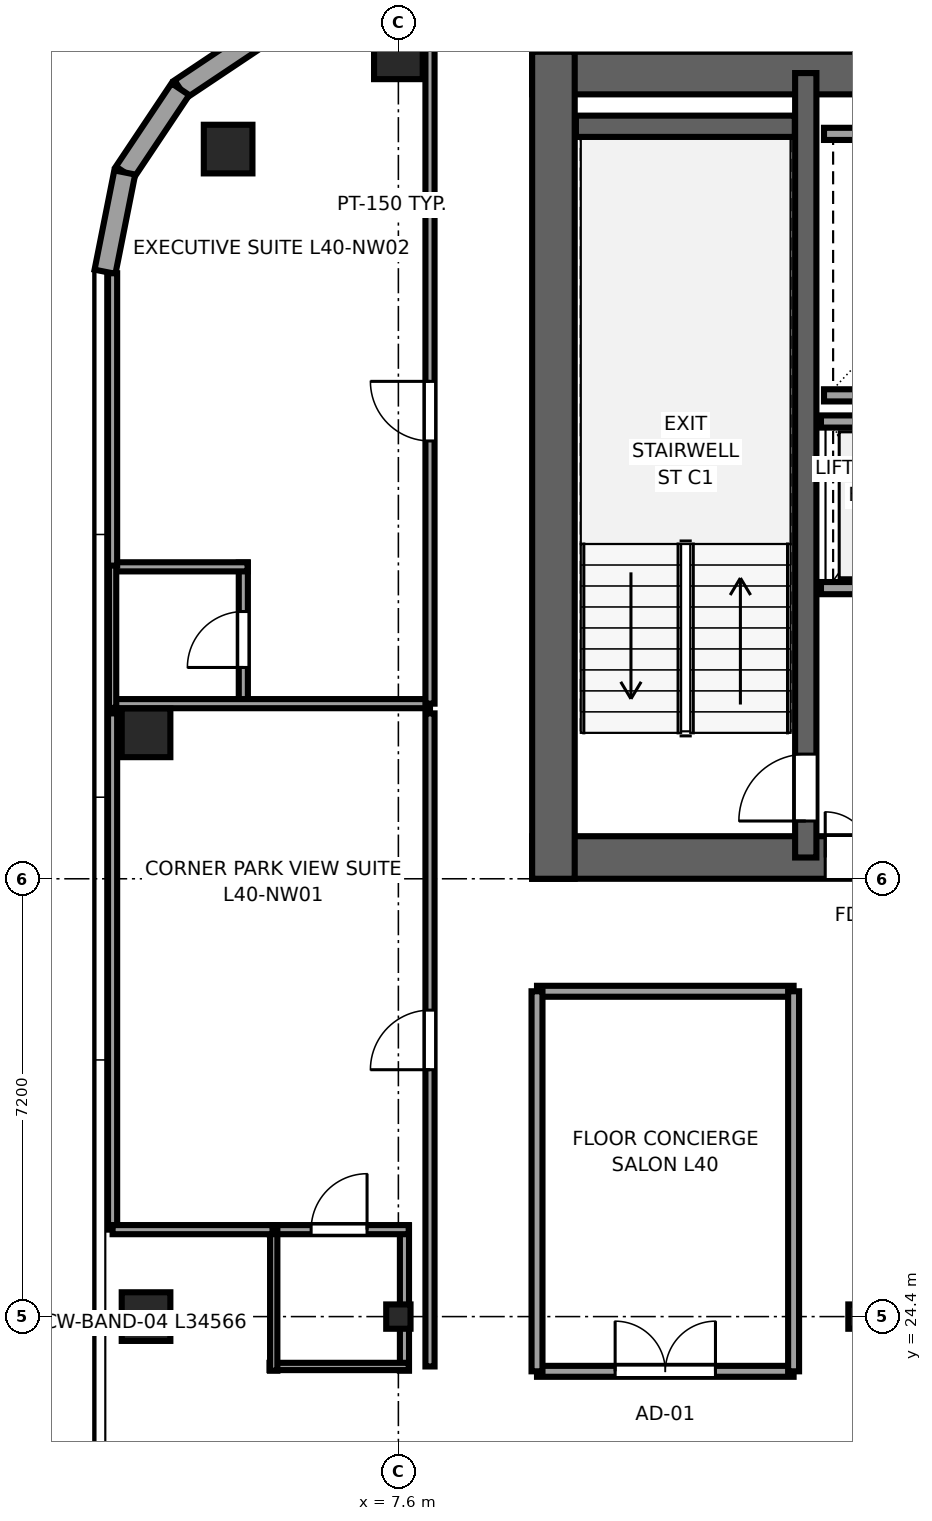
"""IFC4 building model, lengths in metres.
Left out: names, types, materials, properties, quantities, classifications, styles, units other than length and angle.
Written with IfcOpenShell. Run it as: python <this file> out.ifc"""

import sys

from ifc_helpers import new_model, si_unit, direction, frame, frame_2d, origin, origin_2d, place, context, subcontext, project, spatial, rectangle, i_section, extrude, source, transform, mapped, element, fill, save


model = new_model("IFC4")
c1 = context("Model", 3, precision=1e-05, world=origin(), true_north=direction((0.0, 1.0)))
c2 = subcontext(c1, "Body", "Model", "MODEL_VIEW")
j1 = project(units=[si_unit("LENGTHUNIT", "METRE"), si_unit("PLANEANGLEUNIT", "RADIAN")], contexts=[c1])
p1 = place(None, origin())
s1 = spatial("IfcSite", under=j1, at=p1, CompositionType="ELEMENT")
p2 = place(p1, origin())
s2 = spatial("IfcBuilding", under=s1, at=p2, CompositionType="ELEMENT")
p3 = place(p2, frame((0.0, 0.0, 154.15)))
s3 = spatial("IfcBuildingStorey", under=s2, at=p3, CompositionType="ELEMENT", Elevation=154.15)
p4 = place(p3, frame((9.8, 31.95, 0.0), z_axis=(0.0, 0.0, 1.0), x_axis=(1.0, 0.0, 0.0)))
e1 = element("IfcWall", 1, at=p4, inside=s3, PredefinedType="SHEAR", context=c2, shape_type="SweptSolid", body=[
    extrude(rectangle(XDim=26.4, YDim=0.7, at=frame_2d((13.2, 0.0))), origin(), (0.0, 0.0, 1.0), 3.55),
])
p5 = place(p4, frame((6.32, 0.0, 0.0), z_axis=(0.0, 0.0, 1.0), x_axis=(-1.0, 0.0, 0.0)))
e2 = element("IfcOpeningElement", 2, at=p5, cuts=e1, PredefinedType="OPENING", context=c2, shape_type="SweptSolid", body=[
    extrude(rectangle(XDim=1.5, YDim=2.04, at=frame_2d((0.75, 1.02))), frame((0.0, 0.36, 0.0), z_axis=(0.0, -1.0, 0.0), x_axis=(1.0, 0.0, 0.0)), (0.0, 0.0, 1.0), 0.72),
])
p6 = place(p4, frame((13.95, 0.0, 0.0), z_axis=(0.0, 0.0, 1.0), x_axis=(-1.0, 0.0, 0.0)))
e3 = element("IfcOpeningElement", 3, at=p6, cuts=e1, PredefinedType="OPENING", context=c2, shape_type="SweptSolid", body=[
    extrude(rectangle(XDim=1.5, YDim=2.04, at=frame_2d((0.75, 1.02))), frame((0.0, 0.36, 0.0), z_axis=(0.0, -1.0, 0.0), x_axis=(1.0, 0.0, 0.0)), (0.0, 0.0, 1.0), 0.72),
])
p7 = place(p4, frame((20.25, 0.0, 0.0), z_axis=(0.0, 0.0, 1.0), x_axis=(-1.0, 0.0, 0.0)))
e4 = element("IfcOpeningElement", 4, at=p7, cuts=e1, PredefinedType="OPENING", context=c2, shape_type="SweptSolid", body=[
    extrude(rectangle(XDim=1.5, YDim=2.04, at=frame_2d((0.75, 1.02))), frame((0.0, 0.36, 0.0), z_axis=(0.0, -1.0, 0.0), x_axis=(1.0, 0.0, 0.0)), (0.0, 0.0, 1.0), 0.72),
])
p8 = place(p4, frame((8.37, 0.0, 0.0), z_axis=(0.0, 0.0, 1.0), x_axis=(-1.0, 0.0, 0.0)))
e5 = element("IfcOpeningElement", 5, at=p8, cuts=e1, PredefinedType="OPENING", context=c2, shape_type="SweptSolid", body=[
    extrude(rectangle(XDim=0.82, YDim=2.01, at=frame_2d((0.41, 1.005))), frame((0.0, 0.36, 0.0), z_axis=(0.0, -1.0, 0.0), x_axis=(1.0, 0.0, 0.0)), (0.0, 0.0, 1.0), 0.72),
])
p9 = place(p3, frame((9.8, 44.85, 0.0), z_axis=(0.0, 0.0, 1.0), x_axis=(1.0, 0.0, 0.0)))
e6 = element("IfcWall", 6, at=p9, inside=s3, PredefinedType="SHEAR", context=c2, shape_type="SweptSolid", body=[
    extrude(rectangle(XDim=26.4, YDim=0.7, at=frame_2d((13.2, 0.0))), origin(), (0.0, 0.0, 1.0), 3.55),
])
p10 = place(p3, frame((10.15, 31.6, 0.0), z_axis=(0.0, 0.0, 1.0), x_axis=(0.0, 1.0, 0.0)))
e7 = element("IfcWall", 7, at=p10, inside=s3, PredefinedType="SHEAR", context=c2, shape_type="SweptSolid", body=[
    extrude(rectangle(XDim=13.6, YDim=0.7, at=frame_2d((6.8, 0.0))), origin(), (0.0, 0.0, 1.0), 3.55),
])
p11 = place(p3, frame((14.3, 31.95, 0.0), z_axis=(0.0, 0.0, 1.0), x_axis=(0.0, 1.0, 0.0)))
e8 = element("IfcWall", 8, at=p11, inside=s3, PredefinedType="SHEAR", context=c2, shape_type="SweptSolid", body=[
    extrude(rectangle(XDim=12.9, YDim=0.35, at=frame_2d((6.45, 0.0))), origin(), (0.0, 0.0, 1.0), 3.55),
])
p12 = place(p11, frame((0.6, 0.0, 0.0)))
e9 = element("IfcOpeningElement", 9, at=p12, cuts=e8, PredefinedType="OPENING", context=c2, shape_type="SweptSolid", body=[
    extrude(rectangle(XDim=1.1, YDim=2.12, at=frame_2d((0.55, 1.06))), frame((0.0, 0.185, 0.0), z_axis=(0.0, -1.0, 0.0), x_axis=(1.0, 0.0, 0.0)), (0.0, 0.0, 1.0), 0.37),
])
p13 = place(p3, frame((10.52, 43.975, 0.0), z_axis=(0.0, 0.0, 1.0), x_axis=(1.0, 0.0, 0.0)))
e10 = element("IfcWall", 10, at=p13, inside=s3, PredefinedType="SHEAR", context=c2, shape_type="SweptSolid", body=[
    extrude(rectangle(XDim=3.6, YDim=0.35, at=frame_2d((1.8, 0.0))), origin(), (0.0, 0.0, 1.0), 3.55),
])
m1 = source(origin(), c2, "Body", "SweptSolid", [
    extrude(rectangle(XDim=0.8, YDim=0.8, at=origin_2d()), origin(), (0.0, 0.0, 1.0), 3.55),
])
p14 = place(p3, frame((3.45, 24.4, 0.0), z_axis=(0.0, 0.0, 1.0), x_axis=(1.0, 0.0, 0.0)))
e11 = element("IfcColumn", 11, at=p14, inside=s3, PredefinedType="COLUMN", context=c2, shape_type="MappedRepresentation", body=[
    mapped(m1, transform((0.0, 0.0, 0.0), x_axis=(1.0, 0.0, 0.0), y_axis=(0.0, 1.0, 0.0), z_axis=(0.0, 0.0, 1.0), scale=1.0)),
])
m2 = source(origin(), c2, "Body", "SweptSolid", [
    extrude(i_section(OverallWidth=0.4, OverallDepth=0.4, WebThickness=0.02, FlangeThickness=0.035, at=origin_2d()), origin(), (0.0, 0.0, 1.0), 3.55),
])
for number, where, z_axis, x_axis in (
    (12, (7.6, 24.4, 0.0), (0.0, 0.0, 1.0), (1.0, 0.0, 0.0)),
    (13, (15.2, 24.4, 0.0), (0.0, 0.0, 1.0), (1.0, 0.0, 0.0)),
):
    element("IfcColumn", number, at=place(p3, frame(where, z_axis=z_axis, x_axis=x_axis)), inside=s3, PredefinedType="COLUMN", context=c2, shape_type="MappedRepresentation", body=[
        mapped(m2, transform((0.0, 0.0, 0.0), x_axis=(1.0, 0.0, 0.0), y_axis=(0.0, 1.0, 0.0), z_axis=(0.0, 0.0, 1.0), scale=1.0)),
    ])
for number, where, z_axis, x_axis in (
    (14, (4.8, 43.6, 0.0), (0.0, 0.0, 1.0), (1.0, 0.0, 0.0)),
    (15, (7.6, 45.15, 0.0), (0.0, 0.0, 1.0), (1.0, 0.0, 0.0)),
    (16, (3.45, 34.0, 0.0), (0.0, 0.0, 1.0), (1.0, 0.0, 0.0)),
):
    element("IfcColumn", number, at=place(p3, frame(where, z_axis=z_axis, x_axis=x_axis)), inside=s3, PredefinedType="COLUMN", context=c2, shape_type="MappedRepresentation", body=[
        mapped(m1, transform((0.0, 0.0, 0.0), x_axis=(1.0, 0.0, 0.0), y_axis=(0.0, 1.0, 0.0), z_axis=(0.0, 0.0, 1.0), scale=1.0)),
    ])
for number, where, z_axis, x_axis in (
    (17, (5.385, 45.5, 0.0), (0.0, 0.0, 1.0), (-0.832, -0.556, 0.0)),
    (18, (4.015, 44.585, 0.0), (0.0, 0.0, 1.0), (-0.556, -0.831, 0.0)),
):
    element("IfcWall", number, at=place(p3, frame(where, z_axis=z_axis, x_axis=x_axis)), inside=s3, PredefinedType="SOLIDWALL", context=c2, shape_type="SweptSolid", body=[
        extrude(rectangle(XDim=1.647, YDim=0.35, at=frame_2d((0.824, 0.0))), origin(), (0.0, 0.0, 1.0), 2.832),
    ])
p15 = place(p3, frame((3.1, 43.216, 0.0), z_axis=(0.0, 0.0, 1.0), x_axis=(-0.195044345786, -0.980794424524, 0.0)))
e19 = element("IfcWall", 19, at=p15, inside=s3, PredefinedType="SOLIDWALL", context=c2, shape_type="SweptSolid", body=[
    extrude(rectangle(XDim=1.665, YDim=0.35, at=frame_2d((0.833, 0.0))), origin(), (0.0, 0.0, 1.0), 3.37),
])
for number, where, z_axis, x_axis in (
    (20, (14.6, 39.55, 0.0), (0.0, 0.0, 1.0), (1.0, 0.0, 0.0)),
    (21, (14.6, 43.85, 0.0), (0.0, 0.0, 1.0), (1.0, 0.0, 0.0)),
):
    element("IfcWall", number, at=place(p3, frame(where, z_axis=z_axis, x_axis=x_axis)), inside=s3, PredefinedType="SOLIDWALL", context=c2, shape_type="SweptSolid", body=[
        extrude(rectangle(XDim=4.1, YDim=0.2, at=frame_2d((2.05, 0.0))), origin(), (0.0, 0.0, 1.0), 3.37),
    ])
p16 = place(p3, frame((14.55, 36.38, 0.0), z_axis=(0.0, 0.0, 1.0), x_axis=(1.0, 0.0, 0.0)))
e22 = element("IfcWall", 22, at=p16, inside=s3, PredefinedType="SOLIDWALL", context=c2, shape_type="SweptSolid", body=[
    extrude(rectangle(XDim=4.075, YDim=0.2, at=frame_2d((2.038, 0.0))), origin(), (0.0, 0.0, 1.0), 3.37),
])
p17 = place(p16, frame((0.55, 0.0, 0.0)))
e23 = element("IfcOpeningElement", 23, at=p17, cuts=e22, PredefinedType="OPENING", context=c2, shape_type="SweptSolid", body=[
    extrude(rectangle(XDim=1.1, YDim=2.12, at=frame_2d((0.55, 1.06))), frame((0.0, 0.11, 0.0), z_axis=(0.0, -1.0, 0.0), x_axis=(1.0, 0.0, 0.0)), (0.0, 0.0, 1.0), 0.22),
])
p18 = place(p16, frame((2.45, 0.0, 0.0)))
e24 = element("IfcOpeningElement", 24, at=p18, cuts=e22, PredefinedType="OPENING", context=c2, shape_type="SweptSolid", body=[
    extrude(rectangle(XDim=1.1, YDim=2.12, at=frame_2d((0.55, 1.06))), frame((0.0, 0.11, 0.0), z_axis=(0.0, -1.0, 0.0), x_axis=(1.0, 0.0, 0.0)), (0.0, 0.0, 1.0), 0.22),
])
p19 = place(p3, frame((14.55, 39.12, 0.0), z_axis=(0.0, 0.0, 1.0), x_axis=(1.0, 0.0, 0.0)))
e25 = element("IfcWall", 25, at=p19, inside=s3, PredefinedType="SOLIDWALL", context=c2, shape_type="SweptSolid", body=[
    extrude(rectangle(XDim=4.075, YDim=0.2, at=frame_2d((2.038, 0.0))), origin(), (0.0, 0.0, 1.0), 3.37),
])
p20 = place(p3, frame((7.7, 23.51, 0.0), z_axis=(0.0, 0.0, 1.0), x_axis=(0.0, 1.0, 0.0)))
e26 = element("IfcWall", 26, at=p20, inside=s3, PredefinedType="PARTITIONING", context=c2, shape_type="SweptSolid", body=[
    extrude(rectangle(XDim=2.39, YDim=0.15, at=frame_2d((1.195, 0.0))), origin(), (0.0, 0.0, 1.0), 2.16),
])
p21 = place(p3, frame((5.48, 23.58, 0.0), z_axis=(0.0, 0.0, 1.0), x_axis=(1.0, 0.0, 0.0)))
e27 = element("IfcWall", 27, at=p21, inside=s3, PredefinedType="PLUMBINGWALL", context=c2, shape_type="SweptSolid", body=[
    extrude(rectangle(XDim=2.29, YDim=0.12, at=frame_2d((1.145, 0.0))), origin(), (0.0, 0.0, 1.0), 3.37),
])
p22 = place(p3, frame((5.48, 25.83, 0.0), z_axis=(0.0, 0.0, 1.0), x_axis=(1.0, 0.0, 0.0)))
e28 = element("IfcWall", 28, at=p22, inside=s3, PredefinedType="PARTITIONING", context=c2, shape_type="SweptSolid", body=[
    extrude(rectangle(XDim=2.29, YDim=0.15, at=frame_2d((1.145, 0.0))), origin(), (0.0, 0.0, 1.0), 3.37),
])
p23 = place(p22, frame((0.685, 0.0, 0.0)))
e29 = element("IfcOpeningElement", 29, at=p23, cuts=e28, PredefinedType="OPENING", context=c2, shape_type="SweptSolid", body=[
    extrude(rectangle(XDim=0.92, YDim=2.01, at=frame_2d((0.46, 1.005))), frame((0.0, 0.085, 0.0), z_axis=(0.0, -1.0, 0.0), x_axis=(1.0, 0.0, 0.0)), (0.0, 0.0, 1.0), 0.17),
])
p24 = place(p3, frame((5.55, 23.51, 0.0), z_axis=(0.0, 0.0, 1.0), x_axis=(0.0, 1.0, 0.0)))
e30 = element("IfcWall", 30, at=p24, inside=s3, PredefinedType="PLUMBINGWALL", context=c2, shape_type="SweptSolid", body=[
    extrude(rectangle(XDim=2.39, YDim=0.12, at=frame_2d((1.195, 0.0))), origin(), (0.0, 0.0, 1.0), 3.37),
])
p25 = place(p3, frame((5.05, 34.41, 0.0), z_axis=(0.0, 0.0, 1.0), x_axis=(0.0, 1.0, 0.0)))
e31 = element("IfcWall", 31, at=p25, inside=s3, PredefinedType="PARTITIONING", context=c2, shape_type="SweptSolid", body=[
    extrude(rectangle(XDim=2.39, YDim=0.15, at=frame_2d((1.195, 0.0))), origin(), (0.0, 0.0, 1.0), 3.37),
])
p26 = place(p25, frame((0.665, 0.0, 0.0)))
e32 = element("IfcOpeningElement", 32, at=p26, cuts=e31, PredefinedType="OPENING", context=c2, shape_type="SweptSolid", body=[
    extrude(rectangle(XDim=0.92, YDim=2.01, at=frame_2d((0.46, 1.005))), frame((0.0, 0.085, 0.0), z_axis=(0.0, -1.0, 0.0), x_axis=(1.0, 0.0, 0.0)), (0.0, 0.0, 1.0), 0.17),
])
p27 = place(p3, frame((2.83, 34.48, 0.0), z_axis=(0.0, 0.0, 1.0), x_axis=(1.0, 0.0, 0.0)))
e33 = element("IfcWall", 33, at=p27, inside=s3, PredefinedType="PARTITIONING", context=c2, shape_type="SweptSolid", body=[
    extrude(rectangle(XDim=5.29, YDim=0.15, at=frame_2d((2.645, 0.0))), origin(), (0.0, 0.0, 1.0), 3.37),
])
p28 = place(p3, frame((2.83, 36.73, 0.0), z_axis=(0.0, 0.0, 1.0), x_axis=(1.0, 0.0, 0.0)))
e34 = element("IfcWall", 34, at=p28, inside=s3, PredefinedType="PARTITIONING", context=c2, shape_type="SweptSolid", body=[
    extrude(rectangle(XDim=2.29, YDim=0.15, at=frame_2d((1.145, 0.0))), origin(), (0.0, 0.0, 1.0), 3.37),
])
p29 = place(p3, frame((2.9, 34.41, 0.0), z_axis=(0.0, 0.0, 1.0), x_axis=(0.0, 1.0, 0.0)))
e35 = element("IfcWall", 35, at=p29, inside=s3, PredefinedType="PLUMBINGWALL", context=c2, shape_type="SweptSolid", body=[
    extrude(rectangle(XDim=2.39, YDim=0.12, at=frame_2d((1.195, 0.0))), origin(), (0.0, 0.0, 1.0), 3.37),
])
p30 = place(p3, frame((8.12, 23.58, 0.0), z_axis=(0.0, 0.0, 1.0), x_axis=(0.0, 1.0, 0.0)))
e36 = element("IfcWall", 36, at=p30, inside=s3, PredefinedType="PARTITIONING", context=c2, shape_type="SweptSolid", body=[
    extrude(rectangle(XDim=10.74, YDim=0.15, at=frame_2d((5.37, 0.0))), origin(), (0.0, 0.0, 1.0), 3.37),
])
p31 = place(p30, frame((4.88, 0.0, 0.0)))
e37 = element("IfcOpeningElement", 37, at=p31, cuts=e36, PredefinedType="OPENING", context=c2, shape_type="SweptSolid", body=[
    extrude(rectangle(XDim=0.98, YDim=2.12, at=frame_2d((0.49, 1.06))), frame((0.0, 0.085, 0.0), z_axis=(0.0, -1.0, 0.0), x_axis=(1.0, 0.0, 0.0)), (0.0, 0.0, 1.0), 0.17),
])
p32 = place(p3, frame((2.9, 25.83, 0.0), z_axis=(0.0, 0.0, 1.0), x_axis=(0.0, 1.0, 0.0)))
e38 = element("IfcWall", 38, at=p32, inside=s3, PredefinedType="PARTITIONING", context=c2, shape_type="SweptSolid", body=[
    extrude(rectangle(XDim=8.49, YDim=0.15, at=frame_2d((4.245, 0.0))), origin(), (0.0, 0.0, 1.0), 3.37),
])
p33 = place(p3, frame((2.9, 25.83, 0.0), z_axis=(0.0, 0.0, 1.0), x_axis=(1.0, 0.0, 0.0)))
e39 = element("IfcWall", 39, at=p33, inside=s3, PredefinedType="PARTITIONING", context=c2, shape_type="SweptSolid", body=[
    extrude(rectangle(XDim=2.63, YDim=0.15, at=frame_2d((1.315, 0.0))), origin(), (0.0, 0.0, 1.0), 3.37),
])
p34 = place(p3, frame((8.12, 34.48, 0.0), z_axis=(0.0, 0.0, 1.0), x_axis=(0.0, 1.0, 0.0)))
e40 = element("IfcWall", 40, at=p34, inside=s3, PredefinedType="PARTITIONING", context=c2, shape_type="SweptSolid", body=[
    extrude(rectangle(XDim=11.115, YDim=0.15, at=frame_2d((5.558, 0.0))), origin(), (0.0, 0.0, 1.0), 3.37),
])
p35 = place(p34, frame((4.32, 0.0, 0.0)))
e41 = element("IfcOpeningElement", 41, at=p35, cuts=e40, PredefinedType="OPENING", context=c2, shape_type="SweptSolid", body=[
    extrude(rectangle(XDim=0.98, YDim=2.12, at=frame_2d((0.49, 1.06))), frame((0.0, 0.085, 0.0), z_axis=(0.0, -1.0, 0.0), x_axis=(1.0, 0.0, 0.0)), (0.0, 0.0, 1.0), 0.17),
])
p36 = place(p3, frame((2.9, 36.75, 0.0), z_axis=(0.0, 0.0, 1.0), x_axis=(0.0, 1.0, 0.0)))
e42 = element("IfcWall", 42, at=p36, inside=s3, PredefinedType="PARTITIONING", context=c2, shape_type="SweptSolid", body=[
    extrude(rectangle(XDim=4.808, YDim=0.15, at=frame_2d((2.404, 0.0))), origin(), (0.0, 0.0, 1.0), 3.37),
])
p37 = place(p3, frame((9.88, 23.5, 0.0), z_axis=(0.0, 0.0, 1.0), x_axis=(1.0, 0.0, 0.0)))
e43 = element("IfcWall", 43, at=p37, inside=s3, PredefinedType="PARTITIONING", context=c2, shape_type="SweptSolid", body=[
    extrude(rectangle(XDim=4.22, YDim=0.18, at=frame_2d((2.11, 0.0))), origin(), (0.0, 0.0, 1.0), 3.37),
])
p38 = place(p37, frame((1.285, 0.0, 0.0)))
e44 = element("IfcOpeningElement", 44, at=p38, cuts=e43, PredefinedType="OPENING", context=c2, shape_type="SweptSolid", body=[
    extrude(rectangle(XDim=1.65, YDim=2.15, at=frame_2d((0.825, 1.075))), frame((0.0, 0.1, 0.0), z_axis=(0.0, -1.0, 0.0), x_axis=(1.0, 0.0, 0.0)), (0.0, 0.0, 1.0), 0.2),
])
p39 = place(p3, frame((9.88, 29.75, 0.0), z_axis=(0.0, 0.0, 1.0), x_axis=(1.0, 0.0, 0.0)))
e45 = element("IfcWall", 45, at=p39, inside=s3, PredefinedType="PARTITIONING", context=c2, shape_type="SweptSolid", body=[
    extrude(rectangle(XDim=4.22, YDim=0.18, at=frame_2d((2.11, 0.0))), origin(), (0.0, 0.0, 1.0), 3.37),
])
for number, where, z_axis, x_axis in (
    (46, (9.88, 23.5, 0.0), (0.0, 0.0, 1.0), (0.0, 1.0, 0.0)),
    (47, (14.1, 23.5, 0.0), (0.0, 0.0, 1.0), (0.0, 1.0, 0.0)),
):
    element("IfcWall", number, at=place(p3, frame(where, z_axis=z_axis, x_axis=x_axis)), inside=s3, PredefinedType="PARTITIONING", context=c2, shape_type="SweptSolid", body=[
        extrude(rectangle(XDim=6.25, YDim=0.18, at=frame_2d((3.125, 0.0))), origin(), (0.0, 0.0, 1.0), 3.37),
    ])
m3 = source(origin(), c2, "Body", "SweptSolid", [
    extrude(rectangle(XDim=1.1, YDim=2.12, at=frame_2d((0.55, 1.06))), frame((0.0, 0.025, 0.0), z_axis=(0.0, -1.0, 0.0), x_axis=(1.0, 0.0, 0.0)), (0.0, 0.0, 1.0), 0.05),
])
p40 = place(p12, origin())
e48 = element("IfcDoor", 48, at=p40, inside=s3, OperationType="SINGLE_SWING_LEFT", PredefinedType="DOOR", context=c2, shape_type="MappedRepresentation", body=[
    mapped(m3, transform((0.0, 0.0, 0.0), x_axis=(1.0, 0.0, 0.0), y_axis=(0.0, 1.0, 0.0), z_axis=(0.0, 0.0, 1.0), scale=1.0)),
])
fill(e9, e48)
m4 = source(origin(), c2, "Body", "SweptSolid", [
    extrude(rectangle(XDim=1.5, YDim=2.04, at=frame_2d((0.75, 1.02))), frame((0.0, 0.025, 0.0), z_axis=(0.0, -1.0, 0.0), x_axis=(1.0, 0.0, 0.0)), (0.0, 0.0, 1.0), 0.05),
])
p41 = place(p5, origin())
e49 = element("IfcDoor", 49, at=p41, inside=s3, OperationType="DOUBLE_DOOR_SINGLE_SWING", PredefinedType="DOOR", context=c2, shape_type="MappedRepresentation", body=[
    mapped(m4, transform((0.0, 0.0, 0.0), x_axis=(1.0, 0.0, 0.0), y_axis=(0.0, 1.0, 0.0), z_axis=(0.0, 0.0, 1.0), scale=1.0)),
])
fill(e2, e49)
m5 = source(origin(), c2, "Body", "SweptSolid", [
    extrude(rectangle(XDim=0.92, YDim=2.01, at=frame_2d((0.46, 1.005))), frame((0.0, 0.025, 0.0), z_axis=(0.0, -1.0, 0.0), x_axis=(1.0, 0.0, 0.0)), (0.0, 0.0, 1.0), 0.05),
])
p42 = place(p23, origin())
e50 = element("IfcDoor", 50, at=p42, inside=s3, OperationType="SINGLE_SWING_RIGHT", PredefinedType="DOOR", context=c2, shape_type="MappedRepresentation", body=[
    mapped(m5, transform((0.0, 0.0, 0.0), x_axis=(1.0, 0.0, 0.0), y_axis=(0.0, 1.0, 0.0), z_axis=(0.0, 0.0, 1.0), scale=1.0)),
])
fill(e29, e50)
p43 = place(p26, origin())
e51 = element("IfcDoor", 51, at=p43, inside=s3, OperationType="SINGLE_SWING_LEFT", PredefinedType="DOOR", context=c2, shape_type="MappedRepresentation", body=[
    mapped(m5, transform((0.0, 0.0, 0.0), x_axis=(1.0, 0.0, 0.0), y_axis=(0.0, 1.0, 0.0), z_axis=(0.0, 0.0, 1.0), scale=1.0)),
])
fill(e32, e51)
m6 = source(origin(), c2, "Body", "SweptSolid", [
    extrude(rectangle(XDim=0.98, YDim=2.12, at=frame_2d((0.49, 1.06))), frame((0.0, 0.025, 0.0), z_axis=(0.0, -1.0, 0.0), x_axis=(1.0, 0.0, 0.0)), (0.0, 0.0, 1.0), 0.05),
])
p44 = place(p31, origin())
e52 = element("IfcDoor", 52, at=p44, inside=s3, OperationType="SINGLE_SWING_LEFT", PredefinedType="DOOR", context=c2, shape_type="MappedRepresentation", body=[
    mapped(m6, transform((0.0, 0.0, 0.0), x_axis=(1.0, 0.0, 0.0), y_axis=(0.0, 1.0, 0.0), z_axis=(0.0, 0.0, 1.0), scale=1.0)),
])
fill(e37, e52)
p45 = place(p35, origin())
e53 = element("IfcDoor", 53, at=p45, inside=s3, OperationType="SINGLE_SWING_RIGHT", PredefinedType="DOOR", context=c2, shape_type="MappedRepresentation", body=[
    mapped(m6, transform((0.0, 0.0, 0.0), x_axis=(1.0, 0.0, 0.0), y_axis=(0.0, 1.0, 0.0), z_axis=(0.0, 0.0, 1.0), scale=1.0)),
])
fill(e41, e53)
m7 = source(origin(), c2, "Body", "SweptSolid", [
    extrude(rectangle(XDim=1.65, YDim=2.15, at=frame_2d((0.825, 1.075))), frame((0.0, 0.025, 0.0), z_axis=(0.0, -1.0, 0.0), x_axis=(1.0, 0.0, 0.0)), (0.0, 0.0, 1.0), 0.05),
])
p46 = place(p38, origin())
e54 = element("IfcDoor", 54, at=p46, inside=s3, OperationType="DOUBLE_DOOR_SINGLE_SWING", PredefinedType="DOOR", context=c2, shape_type="MappedRepresentation", body=[
    mapped(m7, transform((0.0, 0.0, 0.0), x_axis=(1.0, 0.0, 0.0), y_axis=(0.0, 1.0, 0.0), z_axis=(0.0, 0.0, 1.0), scale=1.0)),
])
fill(e44, e54)
save(model, sys.argv[1])
